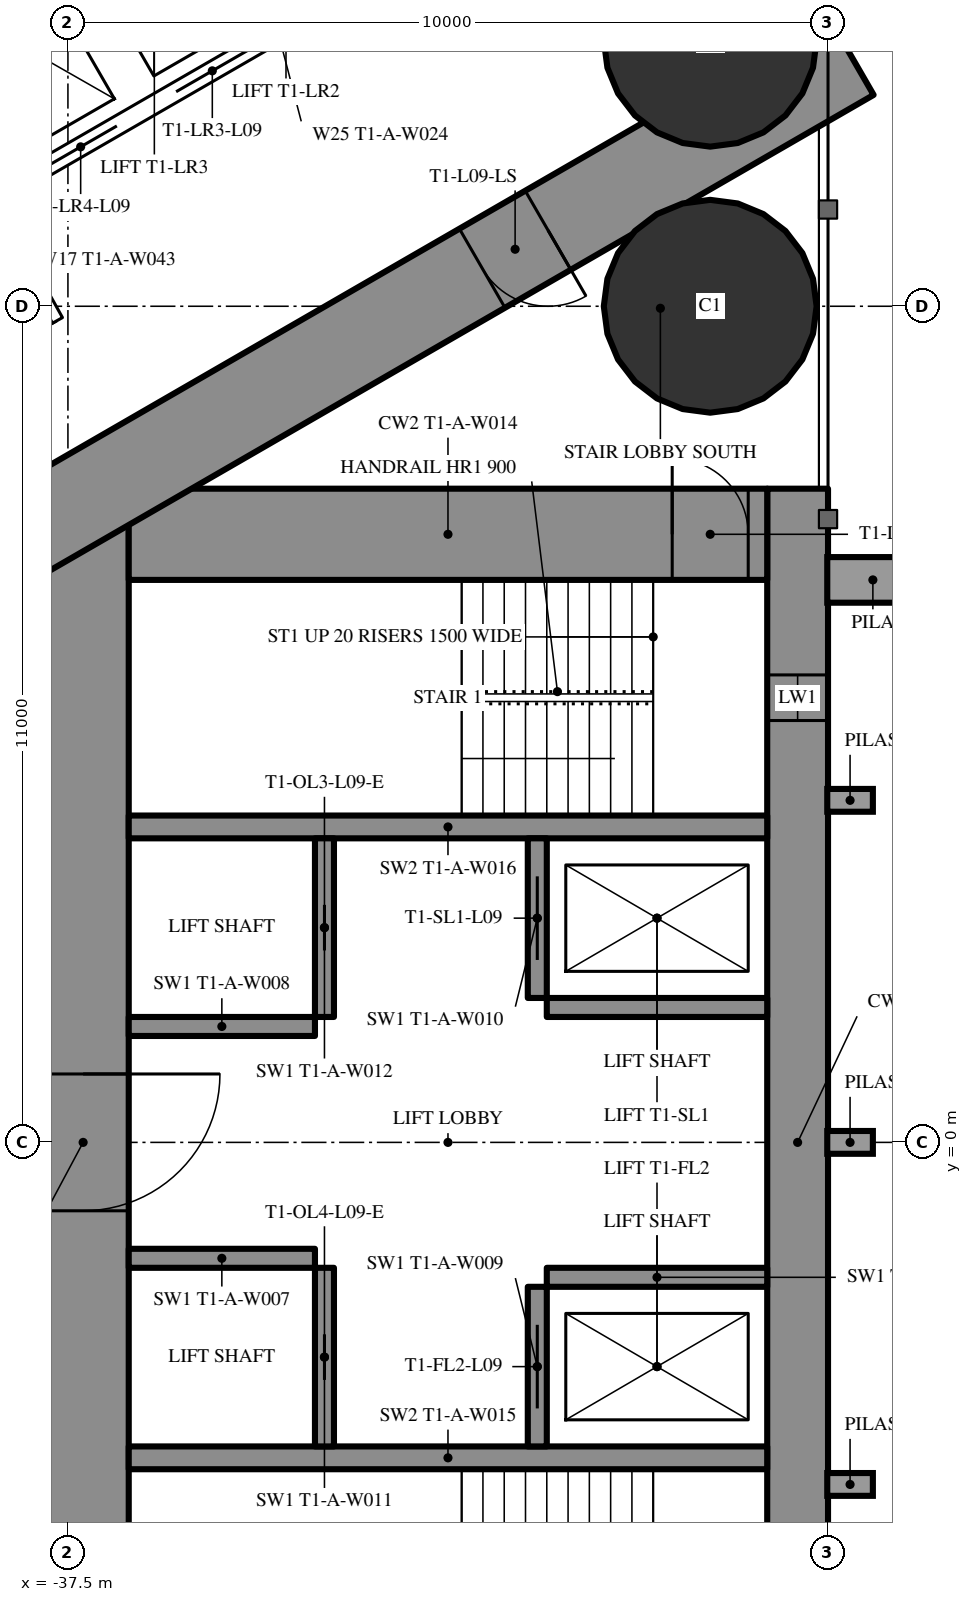
"""IFC4 building model, lengths in metres.
Left out: names, types, materials, properties, quantities, classifications, styles, units other than length and angle.
Written with IfcOpenShell. Run it as: python <this file> out.ifc"""

import sys

from ifc_helpers import new_model, si_unit, direction, frame, frame_2d, origin, origin_2d, place, context, subcontext, project, spatial, rectangle, hollow_circle, extrude, element, fill, save


model = new_model("IFC4")
c1 = context("Model", 3, precision=1e-05, world=origin(), true_north=direction((0.0, 1.0)))
c2 = subcontext(c1, "Body", "Model", "MODEL_VIEW")
j1 = project(units=[si_unit("LENGTHUNIT", "METRE"), si_unit("PLANEANGLEUNIT", "RADIAN")], contexts=[c1])
p1 = place(None, origin())
s1 = spatial("IfcSite", under=j1, at=p1, CompositionType="ELEMENT")
p2 = place(p1, origin())
s2 = spatial("IfcBuilding", under=s1, at=p2, CompositionType="ELEMENT")
p3 = place(p2, frame((0.0, 0.0, 39.0)))
s3 = spatial("IfcBuildingStorey", under=s2, at=p3, CompositionType="ELEMENT", Elevation=39.0)
for number, where, z_axis, x_axis in (
    (1, (-29.05, 11.0, 0.0), (0.0, 0.0, 1.0), (1.0, 0.0, 0.0)),
    (2, (-29.05, 14.5, 0.0), (0.0, 0.0, 1.0), (1.0, 0.0, 0.0)),
):
    element("IfcColumn", number, at=place(p3, frame(where, z_axis=z_axis, x_axis=x_axis)), inside=s3, PredefinedType="COLUMN", context=c2, shape_type="SweptSolid", body=[
        extrude(hollow_circle(Radius=1.4, WallThickness=0.12, at=origin_2d()), origin(), (0.0, 0.0, 1.0), 3.5),
    ])
p4 = place(p3, frame((-27.9, 8.6, 0.0), z_axis=(0.0, 0.0, 1.0), x_axis=(0.0, -1.0, 0.0)))
e3 = element("IfcWall", 3, at=p4, inside=s3, PredefinedType="SHEAR", context=c2, shape_type="SweptSolid", body=[
    extrude(rectangle(XDim=17.2, YDim=0.8, at=frame_2d((8.6, 0.0))), origin(), (0.0, 0.0, 1.0), 3.5),
])
p5 = place(p4, frame((2.45, 0.0, 0.6)))
e4 = element("IfcOpeningElement", 4, at=p5, cuts=e3, PredefinedType="OPENING", context=c2, shape_type="SweptSolid", body=[
    extrude(rectangle(XDim=0.6, YDim=2.1, at=frame_2d((0.3, 1.05))), frame((0.0, 0.41, 0.0), z_axis=(0.0, -1.0, 0.0), x_axis=(1.0, 0.0, 0.0)), (0.0, 0.0, 1.0), 0.82),
])
p6 = place(p4, frame((14.15, 0.0, 0.6)))
e5 = element("IfcOpeningElement", 5, at=p6, cuts=e3, PredefinedType="OPENING", context=c2, shape_type="SweptSolid", body=[
    extrude(rectangle(XDim=0.6, YDim=2.1, at=frame_2d((0.3, 1.05))), frame((0.0, 0.41, 0.0), z_axis=(0.0, -1.0, 0.0), x_axis=(1.0, 0.0, 0.0)), (0.0, 0.0, 1.0), 0.82),
])
p7 = place(p3, frame((-37.3, 8.6, 0.0), z_axis=(0.0, 0.0, 1.0), x_axis=(0.0, -1.0, 0.0)))
e6 = element("IfcWall", 6, at=p7, inside=s3, PredefinedType="SHEAR", context=c2, shape_type="SweptSolid", body=[
    extrude(rectangle(XDim=17.2, YDim=1.2, at=frame_2d((8.6, 0.0))), origin(), (0.0, 0.0, 1.0), 3.5),
])
p8 = place(p7, frame((7.7, 0.0, 0.0)))
e7 = element("IfcOpeningElement", 7, at=p8, cuts=e6, PredefinedType="OPENING", context=c2, shape_type="SweptSolid", body=[
    extrude(rectangle(XDim=1.8, YDim=2.2, at=frame_2d((0.9, 1.1))), frame((0.0, 0.61, 0.0), z_axis=(0.0, -1.0, 0.0), x_axis=(1.0, 0.0, 0.0)), (0.0, 0.0, 1.0), 1.22),
])
p9 = place(p3, frame((-28.3, 8.0, 0.0), z_axis=(0.0, 0.0, 1.0), x_axis=(-1.0, 0.0, 0.0)))
e8 = element("IfcWall", 8, at=p9, inside=s3, PredefinedType="SHEAR", context=c2, shape_type="SweptSolid", body=[
    extrude(rectangle(XDim=8.4, YDim=1.2, at=frame_2d((4.2, 0.0))), origin(), (0.0, 0.0, 1.0), 3.5),
])
p10 = place(p9, frame((0.25, 0.0, 0.0)))
e9 = element("IfcOpeningElement", 9, at=p10, cuts=e8, PredefinedType="OPENING", context=c2, shape_type="SweptSolid", body=[
    extrude(rectangle(XDim=1.0, YDim=2.2, at=frame_2d((0.5, 1.1))), frame((0.0, 0.61, 0.0), z_axis=(0.0, -1.0, 0.0), x_axis=(1.0, 0.0, 0.0)), (0.0, 0.0, 1.0), 1.22),
])
for number, where, z_axis, x_axis in (
    (10, (-28.3, 4.15, 0.0), (0.0, 0.0, 1.0), (-1.0, 0.0, 0.0)),
    (11, (-28.3, -4.15, 0.0), (0.0, 0.0, 1.0), (-1.0, 0.0, 0.0)),
):
    element("IfcWall", number, at=place(p3, frame(where, z_axis=z_axis, x_axis=x_axis)), inside=s3, PredefinedType="SHEAR", context=c2, shape_type="SweptSolid", body=[
        extrude(rectangle(XDim=8.4, YDim=0.3, at=frame_2d((4.2, 0.0))), origin(), (0.0, 0.0, 1.0), 3.5),
    ])
p11 = place(p3, frame((-31.325, 4.0, 0.0), z_axis=(0.0, 0.0, 1.0), x_axis=(0.0, -1.0, 0.0)))
e12 = element("IfcWall", 12, at=p11, inside=s3, PredefinedType="SHEAR", context=c2, shape_type="SweptSolid", body=[
    extrude(rectangle(XDim=2.1, YDim=0.25, at=frame_2d((1.05, 0.0))), origin(), (0.0, 0.0, 1.0), 3.5),
])
p12 = place(p11, frame((0.5, 0.0, 0.0)))
e13 = element("IfcOpeningElement", 13, at=p12, cuts=e12, PredefinedType="OPENING", context=c2, shape_type="SweptSolid", body=[
    extrude(rectangle(XDim=1.1, YDim=2.2, at=frame_2d((0.55, 1.1))), frame((0.0, 0.135, 0.0), z_axis=(0.0, -1.0, 0.0), x_axis=(1.0, 0.0, 0.0)), (0.0, 0.0, 1.0), 0.27),
])
p13 = place(p3, frame((-34.125, 4.0, 0.0), z_axis=(0.0, 0.0, 1.0), x_axis=(0.0, -1.0, 0.0)))
e14 = element("IfcWall", 14, at=p13, inside=s3, PredefinedType="SHEAR", context=c2, shape_type="SweptSolid", body=[
    extrude(rectangle(XDim=2.35, YDim=0.25, at=frame_2d((1.175, 0.0))), origin(), (0.0, 0.0, 1.0), 3.5),
])
p14 = place(p13, frame((0.875, 0.0, 0.0)))
e15 = element("IfcOpeningElement", 15, at=p14, cuts=e14, PredefinedType="OPENING", context=c2, shape_type="SweptSolid", body=[
    extrude(rectangle(XDim=0.6, YDim=2.0, at=frame_2d((0.3, 1.0))), frame((0.0, 0.135, 0.0), z_axis=(0.0, -1.0, 0.0), x_axis=(1.0, 0.0, 0.0)), (0.0, 0.0, 1.0), 0.27),
])
p15 = place(p3, frame((-28.3, 1.775, 0.0), z_axis=(0.0, 0.0, 1.0), x_axis=(-1.0, 0.0, 0.0)))
e16 = element("IfcWall", 16, at=p15, inside=s3, PredefinedType="SHEAR", context=c2, shape_type="SweptSolid", body=[
    extrude(rectangle(XDim=2.9, YDim=0.25, at=frame_2d((1.45, 0.0))), origin(), (0.0, 0.0, 1.0), 3.5),
])
p16 = place(p3, frame((-34.25, 1.525, 0.0), z_axis=(0.0, 0.0, 1.0), x_axis=(-1.0, 0.0, 0.0)))
e17 = element("IfcWall", 17, at=p16, inside=s3, PredefinedType="SHEAR", context=c2, shape_type="SweptSolid", body=[
    extrude(rectangle(XDim=2.45, YDim=0.25, at=frame_2d((1.225, 0.0))), origin(), (0.0, 0.0, 1.0), 3.5),
])
p17 = place(p3, frame((-31.325, -1.9, 0.0), z_axis=(0.0, 0.0, 1.0), x_axis=(0.0, -1.0, 0.0)))
e18 = element("IfcWall", 18, at=p17, inside=s3, PredefinedType="SHEAR", context=c2, shape_type="SweptSolid", body=[
    extrude(rectangle(XDim=2.1, YDim=0.25, at=frame_2d((1.05, 0.0))), origin(), (0.0, 0.0, 1.0), 3.5),
])
p18 = place(p17, frame((0.5, 0.0, 0.0)))
e19 = element("IfcOpeningElement", 19, at=p18, cuts=e18, PredefinedType="OPENING", context=c2, shape_type="SweptSolid", body=[
    extrude(rectangle(XDim=1.1, YDim=2.2, at=frame_2d((0.55, 1.1))), frame((0.0, 0.135, 0.0), z_axis=(0.0, -1.0, 0.0), x_axis=(1.0, 0.0, 0.0)), (0.0, 0.0, 1.0), 0.27),
])
p19 = place(p3, frame((-34.125, -1.65, 0.0), z_axis=(0.0, 0.0, 1.0), x_axis=(0.0, -1.0, 0.0)))
e20 = element("IfcWall", 20, at=p19, inside=s3, PredefinedType="SHEAR", context=c2, shape_type="SweptSolid", body=[
    extrude(rectangle(XDim=2.35, YDim=0.25, at=frame_2d((1.175, 0.0))), origin(), (0.0, 0.0, 1.0), 3.5),
])
p20 = place(p19, frame((0.875, 0.0, 0.0)))
e21 = element("IfcOpeningElement", 21, at=p20, cuts=e20, PredefinedType="OPENING", context=c2, shape_type="SweptSolid", body=[
    extrude(rectangle(XDim=0.6, YDim=2.0, at=frame_2d((0.3, 1.0))), frame((0.0, 0.135, 0.0), z_axis=(0.0, -1.0, 0.0), x_axis=(1.0, 0.0, 0.0)), (0.0, 0.0, 1.0), 0.27),
])
p21 = place(p3, frame((-28.3, -1.775, 0.0), z_axis=(0.0, 0.0, 1.0), x_axis=(-1.0, 0.0, 0.0)))
e22 = element("IfcWall", 22, at=p21, inside=s3, PredefinedType="SHEAR", context=c2, shape_type="SweptSolid", body=[
    extrude(rectangle(XDim=2.9, YDim=0.25, at=frame_2d((1.45, 0.0))), origin(), (0.0, 0.0, 1.0), 3.5),
])
p22 = place(p3, frame((-34.25, -1.525, 0.0), z_axis=(0.0, 0.0, 1.0), x_axis=(-1.0, 0.0, 0.0)))
e23 = element("IfcWall", 23, at=p22, inside=s3, PredefinedType="SHEAR", context=c2, shape_type="SweptSolid", body=[
    extrude(rectangle(XDim=2.45, YDim=0.25, at=frame_2d((1.225, 0.0))), origin(), (0.0, 0.0, 1.0), 3.5),
])
p23 = place(p3, frame((-27.2, 14.3, 0.0), z_axis=(0.0, 0.0, 1.0), x_axis=(-0.866026593062, -0.499997940104, 0.0)))
e24 = element("IfcWall", 24, at=p23, inside=s3, PredefinedType="SHEAR", context=c2, shape_type="SweptSolid", body=[
    extrude(rectangle(XDim=28.946, YDim=1.2, at=frame_2d((14.473, 0.0))), origin(), (0.0, 0.0, 1.0), 3.5),
])
p24 = place(p23, frame((4.6, 0.0, 0.0)))
e25 = element("IfcOpeningElement", 25, at=p24, cuts=e24, PredefinedType="OPENING", context=c2, shape_type="SweptSolid", body=[
    extrude(rectangle(XDim=1.0, YDim=2.2, at=frame_2d((0.5, 1.1))), frame((0.0, 0.61, 0.0), z_axis=(0.0, -1.0, 0.0), x_axis=(1.0, 0.0, 0.0)), (0.0, 0.0, 1.0), 1.22),
])
p25 = place(p23, frame((13.395, 0.0, 0.0)))
e26 = element("IfcOpeningElement", 26, at=p25, cuts=e24, PredefinedType="OPENING", context=c2, shape_type="SweptSolid", body=[
    extrude(rectangle(XDim=1.8, YDim=2.2, at=frame_2d((0.9, 1.1))), frame((0.0, 0.61, 0.0), z_axis=(0.0, -1.0, 0.0), x_axis=(1.0, 0.0, 0.0)), (0.0, 0.0, 1.0), 1.22),
])
p26 = place(p3, frame((-27.2, -14.3, 0.0), z_axis=(0.0, 0.0, 1.0), x_axis=(-0.866024021859, 0.500002393557, 0.0)))
e27 = element("IfcWall", 27, at=p26, inside=s3, PredefinedType="SHEAR", context=c2, shape_type="SweptSolid", body=[
    extrude(rectangle(XDim=27.907, YDim=1.2, at=frame_2d((13.954, 0.0))), origin(), (0.0, 0.0, 1.0), 3.5),
])
p27 = place(p26, frame((4.6, 0.0, 0.0)))
e28 = element("IfcOpeningElement", 28, at=p27, cuts=e27, PredefinedType="OPENING", context=c2, shape_type="SweptSolid", body=[
    extrude(rectangle(XDim=1.0, YDim=2.2, at=frame_2d((0.5, 1.1))), frame((0.0, 0.61, 0.0), z_axis=(0.0, -1.0, 0.0), x_axis=(1.0, 0.0, 0.0)), (0.0, 0.0, 1.0), 1.22),
])
p28 = place(p26, frame((13.395, 0.0, 0.0)))
e29 = element("IfcOpeningElement", 29, at=p28, cuts=e27, PredefinedType="OPENING", context=c2, shape_type="SweptSolid", body=[
    extrude(rectangle(XDim=1.8, YDim=2.2, at=frame_2d((0.9, 1.1))), frame((0.0, 0.61, 0.0), z_axis=(0.0, -1.0, 0.0), x_axis=(1.0, 0.0, 0.0)), (0.0, 0.0, 1.0), 1.22),
])
p29 = place(p3, frame((-37.7, 10.894, 0.0), z_axis=(0.0, 0.0, 1.0), x_axis=(-0.866027905338, -0.499995667157, 0.0)))
e30 = element("IfcWall", 30, at=p29, inside=s3, PredefinedType="PARTITIONING", context=c2, shape_type="SweptSolid", body=[
    extrude(rectangle(XDim=21.787, YDim=0.2, at=frame_2d((10.894, 0.0))), origin(), (0.0, 0.0, 1.0), 3.25),
])
p30 = place(p29, frame((11.78, 0.0, 0.0)))
e31 = element("IfcOpeningElement", 31, at=p30, cuts=e30, PredefinedType="OPENING", context=c2, shape_type="SweptSolid", body=[
    extrude(rectangle(XDim=0.95, YDim=2.2, at=frame_2d((0.475, 1.1))), frame((0.0, 0.11, 0.0), z_axis=(0.0, -1.0, 0.0), x_axis=(1.0, 0.0, 0.0)), (0.0, 0.0, 1.0), 0.22),
])
p31 = place(p29, frame((2.95, 0.0, 0.0)))
e32 = element("IfcOpeningElement", 32, at=p31, cuts=e30, PredefinedType="OPENING", context=c2, shape_type="SweptSolid", body=[
    extrude(rectangle(XDim=0.95, YDim=2.2, at=frame_2d((0.475, 1.1))), frame((0.0, 0.11, 0.0), z_axis=(0.0, -1.0, 0.0), x_axis=(1.0, 0.0, 0.0)), (0.0, 0.0, 1.0), 0.22),
])
p32 = place(p3, frame((-36.92, -11.344, 0.0), z_axis=(0.0, 0.0, 1.0), x_axis=(-0.866028313256, 0.499994960614, 0.0)))
e33 = element("IfcWall", 33, at=p32, inside=s3, PredefinedType="PARTITIONING", context=c2, shape_type="SweptSolid", body=[
    extrude(rectangle(XDim=22.568, YDim=0.2, at=frame_2d((11.284, 0.0))), origin(), (0.0, 0.0, 1.0), 3.25),
])
p33 = place(p32, frame((21.018, 0.0, 0.0)))
e34 = element("IfcOpeningElement", 34, at=p33, cuts=e33, PredefinedType="OPENING", context=c2, shape_type="SweptSolid", body=[
    extrude(rectangle(XDim=0.95, YDim=2.2, at=frame_2d((0.475, 1.1))), frame((0.0, 0.11, 0.0), z_axis=(0.0, -1.0, 0.0), x_axis=(1.0, 0.0, 0.0)), (0.0, 0.0, 1.0), 0.22),
])
p34 = place(p32, frame((3.35, 0.0, 0.0)))
e35 = element("IfcOpeningElement", 35, at=p34, cuts=e33, PredefinedType="OPENING", context=c2, shape_type="SweptSolid", body=[
    extrude(rectangle(XDim=1.0, YDim=2.2, at=frame_2d((0.5, 1.1))), frame((0.0, 0.11, 0.0), z_axis=(0.0, -1.0, 0.0), x_axis=(1.0, 0.0, 0.0)), (0.0, 0.0, 1.0), 0.22),
])
p35 = place(p3, frame((-38.513, 12.392, 0.0), z_axis=(0.0, 0.0, 1.0), x_axis=(0.485585508183, -0.874189175317, 0.0)))
e36 = element("IfcWall", 36, at=p35, inside=s3, PredefinedType="PARTITIONING", context=c2, shape_type="SweptSolid", body=[
    extrude(rectangle(XDim=1.805, YDim=0.15, at=frame_2d((0.902, 0.0))), origin(), (0.0, 0.0, 1.0), 3.25),
])
p36 = place(p3, frame((-31.01, 16.747, 0.0), z_axis=(0.0, 0.0, 1.0), x_axis=(-0.866028165386, -0.499995216735, 0.0)))
e37 = element("IfcWall", 37, at=p36, inside=s3, PredefinedType="PARTITIONING", context=c2, shape_type="SweptSolid", body=[
    extrude(rectangle(XDim=8.6, YDim=0.25, at=frame_2d((4.3, 0.0))), origin(), (0.0, 0.0, 1.0), 3.25),
])
p37 = place(p36, frame((0.75, 0.0, 0.0)))
e38 = element("IfcOpeningElement", 38, at=p37, cuts=e37, PredefinedType="OPENING", context=c2, shape_type="SweptSolid", body=[
    extrude(rectangle(XDim=1.1, YDim=2.2, at=frame_2d((0.55, 1.1))), frame((0.0, 0.135, 0.0), z_axis=(0.0, -1.0, 0.0), x_axis=(1.0, 0.0, 0.0)), (0.0, 0.0, 1.0), 0.27),
])
p38 = place(p36, frame((2.75, 0.0, 0.0)))
e39 = element("IfcOpeningElement", 39, at=p38, cuts=e37, PredefinedType="OPENING", context=c2, shape_type="SweptSolid", body=[
    extrude(rectangle(XDim=1.1, YDim=2.2, at=frame_2d((0.55, 1.1))), frame((0.0, 0.135, 0.0), z_axis=(0.0, -1.0, 0.0), x_axis=(1.0, 0.0, 0.0)), (0.0, 0.0, 1.0), 0.27),
])
p39 = place(p36, frame((4.75, 0.0, 0.0)))
e40 = element("IfcOpeningElement", 40, at=p39, cuts=e37, PredefinedType="OPENING", context=c2, shape_type="SweptSolid", body=[
    extrude(rectangle(XDim=1.1, YDim=2.2, at=frame_2d((0.55, 1.1))), frame((0.0, 0.135, 0.0), z_axis=(0.0, -1.0, 0.0), x_axis=(1.0, 0.0, 0.0)), (0.0, 0.0, 1.0), 0.27),
])
p40 = place(p36, frame((6.75, 0.0, 0.0)))
e41 = element("IfcOpeningElement", 41, at=p40, cuts=e37, PredefinedType="OPENING", context=c2, shape_type="SweptSolid", body=[
    extrude(rectangle(XDim=1.1, YDim=2.2, at=frame_2d((0.55, 1.1))), frame((0.0, 0.135, 0.0), z_axis=(0.0, -1.0, 0.0), x_axis=(1.0, 0.0, 0.0)), (0.0, 0.0, 1.0), 0.27),
])
p41 = place(p24, origin())
e42 = element("IfcDoor", 42, at=p41, inside=s3, OperationType="SINGLE_SWING_LEFT", PredefinedType="DOOR", context=c2, shape_type="SweptSolid", body=[
    extrude(rectangle(XDim=1.0, YDim=2.2, at=frame_2d((0.5, 1.1))), frame((0.0, 0.025, 0.0), z_axis=(0.0, -1.0, 0.0), x_axis=(1.0, 0.0, 0.0)), (0.0, 0.0, 1.0), 0.05),
])
fill(e25, e42)
p42 = place(p8, origin())
e43 = element("IfcDoor", 43, at=p42, inside=s3, OperationType="DOUBLE_DOOR_SINGLE_SWING", PredefinedType="DOOR", context=c2, shape_type="SweptSolid", body=[
    extrude(rectangle(XDim=1.8, YDim=2.2, at=frame_2d((0.9, 1.1))), frame((0.0, 0.025, 0.0), z_axis=(0.0, -1.0, 0.0), x_axis=(1.0, 0.0, 0.0)), (0.0, 0.0, 1.0), 0.05),
])
fill(e7, e43)
p43 = place(p10, origin())
e44 = element("IfcDoor", 44, at=p43, inside=s3, OperationType="SINGLE_SWING_RIGHT", PredefinedType="DOOR", context=c2, shape_type="SweptSolid", body=[
    extrude(rectangle(XDim=1.0, YDim=2.2, at=frame_2d((0.5, 1.1))), frame((0.0, 0.025, 0.0), z_axis=(0.0, -1.0, 0.0), x_axis=(1.0, 0.0, 0.0)), (0.0, 0.0, 1.0), 0.05),
])
fill(e9, e44)
p44 = place(p12, origin())
e45 = element("IfcDoor", 45, at=p44, inside=s3, OperationType="SLIDING_TO_LEFT", PredefinedType="USERDEFINED", context=c2, shape_type="SweptSolid", body=[
    extrude(rectangle(XDim=1.1, YDim=2.2, at=frame_2d((0.55, 1.1))), frame((0.0, 0.025, 0.0), z_axis=(0.0, -1.0, 0.0), x_axis=(1.0, 0.0, 0.0)), (0.0, 0.0, 1.0), 0.05),
])
fill(e13, e45)
p45 = place(p18, origin())
e46 = element("IfcDoor", 46, at=p45, inside=s3, OperationType="SLIDING_TO_LEFT", PredefinedType="USERDEFINED", context=c2, shape_type="SweptSolid", body=[
    extrude(rectangle(XDim=1.1, YDim=2.2, at=frame_2d((0.55, 1.1))), frame((0.0, 0.025, 0.0), z_axis=(0.0, -1.0, 0.0), x_axis=(1.0, 0.0, 0.0)), (0.0, 0.0, 1.0), 0.05),
])
fill(e19, e46)
p46 = place(p14, origin())
e47 = element("IfcDoor", 47, at=p46, inside=s3, OperationType="SLIDING_TO_LEFT", PredefinedType="DOOR", context=c2, shape_type="SweptSolid", body=[
    extrude(rectangle(XDim=0.6, YDim=2.0, at=frame_2d((0.3, 1.0))), frame((0.0, 0.025, 0.0), z_axis=(0.0, -1.0, 0.0), x_axis=(1.0, 0.0, 0.0)), (0.0, 0.0, 1.0), 0.05),
])
fill(e15, e47)
p47 = place(p20, origin())
e48 = element("IfcDoor", 48, at=p47, inside=s3, OperationType="SLIDING_TO_LEFT", PredefinedType="DOOR", context=c2, shape_type="SweptSolid", body=[
    extrude(rectangle(XDim=0.6, YDim=2.0, at=frame_2d((0.3, 1.0))), frame((0.0, 0.025, 0.0), z_axis=(0.0, -1.0, 0.0), x_axis=(1.0, 0.0, 0.0)), (0.0, 0.0, 1.0), 0.05),
])
fill(e21, e48)
p48 = place(p39, origin())
e49 = element("IfcDoor", 49, at=p48, inside=s3, OperationType="DOUBLE_DOOR_SLIDING", PredefinedType="USERDEFINED", context=c2, shape_type="SweptSolid", body=[
    extrude(rectangle(XDim=1.1, YDim=2.2, at=frame_2d((0.55, 1.1))), frame((0.0, 0.025, 0.0), z_axis=(0.0, -1.0, 0.0), x_axis=(1.0, 0.0, 0.0)), (0.0, 0.0, 1.0), 0.05),
])
fill(e40, e49)
p49 = place(p40, origin())
e50 = element("IfcDoor", 50, at=p49, inside=s3, OperationType="DOUBLE_DOOR_SLIDING", PredefinedType="USERDEFINED", context=c2, shape_type="SweptSolid", body=[
    extrude(rectangle(XDim=1.1, YDim=2.2, at=frame_2d((0.55, 1.1))), frame((0.0, 0.025, 0.0), z_axis=(0.0, -1.0, 0.0), x_axis=(1.0, 0.0, 0.0)), (0.0, 0.0, 1.0), 0.05),
])
fill(e41, e50)
p50 = place(p5, origin())
e51 = element("IfcWindow", 51, at=p50, inside=s3, PartitioningType="SINGLE_PANEL", PredefinedType="WINDOW", context=c2, shape_type="SweptSolid", body=[
    extrude(rectangle(XDim=0.6, YDim=2.1, at=frame_2d((0.3, 1.05))), frame((0.0, 0.03, 0.0), z_axis=(0.0, -1.0, 0.0), x_axis=(1.0, 0.0, 0.0)), (0.0, 0.0, 1.0), 0.06),
])
fill(e4, e51)
save(model, sys.argv[1])
